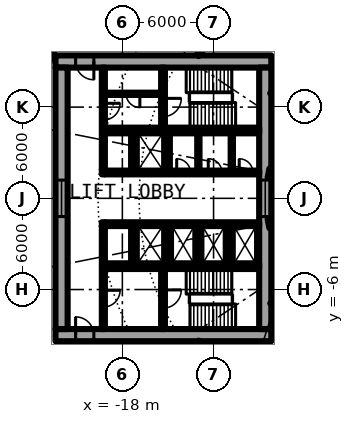
"""IFC4 building model, lengths in metres.
Left out: names, types, materials, properties, quantities, classifications, styles, units other than length and angle.
Written with IfcOpenShell. Run it as: python <this file> out.ifc"""

import sys

from ifc_helpers import new_model, si_unit, direction, frame, frame_2d, origin, origin_2d, place, context, subcontext, project, spatial, rectangle, i_section, extrude, element, fill, save


model = new_model("IFC4")
c1 = context("Model", 3, precision=1e-05, world=origin(), true_north=direction((0.0, 1.0)))
c2 = subcontext(c1, "Body", "Model", "MODEL_VIEW")
j1 = project(units=[si_unit("LENGTHUNIT", "METRE"), si_unit("PLANEANGLEUNIT", "RADIAN")], contexts=[c1])
p1 = place(None, origin())
s1 = spatial("IfcSite", under=j1, at=p1, CompositionType="ELEMENT")
p2 = place(p1, origin())
s2 = spatial("IfcBuilding", under=s1, at=p2, CompositionType="ELEMENT")
p3 = place(p2, frame((0.0, 0.0, 5.4)))
s3 = spatial("IfcBuildingStorey", under=s2, at=p3, CompositionType="ELEMENT", Elevation=5.4)
for number, where, z_axis, x_axis in (
    (1, (-8.239, 1.639, 0.0), (0.0, 0.0, 1.0), (-0.981, 0.195, 0.0)),
    (2, (-8.239, -1.639, 0.0), (0.0, 0.0, 1.0), (-0.981, -0.195, 0.0)),
):
    element("IfcColumn", number, at=place(p3, frame(where, z_axis=z_axis, x_axis=x_axis)), inside=s3, PredefinedType="COLUMN", context=c2, shape_type="SweptSolid", body=[
        extrude(i_section(OverallWidth=0.3, OverallDepth=0.6, WebThickness=0.015, FlangeThickness=0.03, FilletRadius=0.027, at=origin_2d()), origin(), (0.0, 0.0, 1.0), 4.2),
    ])
p4 = place(p3, frame((-22.4, -9.0, 0.0), z_axis=(0.0, 0.0, 1.0), x_axis=(1.0, 0.0, 0.0)))
e3 = element("IfcWall", 3, at=p4, inside=s3, PredefinedType="SHEAR", context=c2, shape_type="SweptSolid", body=[
    extrude(rectangle(XDim=14.2, YDim=0.8, at=frame_2d((7.1, 0.0))), origin(), (0.0, 0.0, 1.0), 4.2),
])
p5 = place(p4, frame((1.325, 0.0, 0.0)))
e4 = element("IfcOpeningElement", 4, at=p5, cuts=e3, PredefinedType="OPENING", context=c2, shape_type="SweptSolid", body=[
    extrude(rectangle(XDim=1.2, YDim=2.3, at=frame_2d((0.6, 1.15))), frame((0.0, 0.41, 0.0), z_axis=(0.0, -1.0, 0.0), x_axis=(1.0, 0.0, 0.0)), (0.0, 0.0, 1.0), 0.82),
])
p6 = place(p3, frame((-8.2, 9.0, 0.0), z_axis=(0.0, 0.0, 1.0), x_axis=(-1.0, 0.0, 0.0)))
e5 = element("IfcWall", 5, at=p6, inside=s3, PredefinedType="SHEAR", context=c2, shape_type="SweptSolid", body=[
    extrude(rectangle(XDim=14.2, YDim=0.8, at=frame_2d((7.1, 0.0))), origin(), (0.0, 0.0, 1.0), 4.2),
])
p7 = place(p6, frame((11.675, 0.0, 0.0)))
e6 = element("IfcOpeningElement", 6, at=p7, cuts=e5, PredefinedType="OPENING", context=c2, shape_type="SweptSolid", body=[
    extrude(rectangle(XDim=1.2, YDim=2.3, at=frame_2d((0.6, 1.15))), frame((0.0, 0.41, 0.0), z_axis=(0.0, -1.0, 0.0), x_axis=(1.0, 0.0, 0.0)), (0.0, 0.0, 1.0), 0.82),
])
p8 = place(p3, frame((-22.0, 8.6, 0.0), z_axis=(0.0, 0.0, 1.0), x_axis=(0.0, -1.0, 0.0)))
e7 = element("IfcWall", 7, at=p8, inside=s3, PredefinedType="SHEAR", context=c2, shape_type="SweptSolid", body=[
    extrude(rectangle(XDim=17.2, YDim=0.8, at=frame_2d((8.6, 0.0))), origin(), (0.0, 0.0, 1.0), 4.2),
])
p9 = place(p8, frame((7.4, 0.0, 0.1)))
e8 = element("IfcOpeningElement", 8, at=p9, cuts=e7, PredefinedType="OPENING", context=c2, shape_type="SweptSolid", body=[
    extrude(rectangle(XDim=2.4, YDim=2.2, at=frame_2d((1.2, 1.1))), frame((0.0, 0.41, 0.0), z_axis=(0.0, -1.0, 0.0), x_axis=(1.0, 0.0, 0.0)), (0.0, 0.0, 1.0), 0.82),
])
p10 = place(p3, frame((-8.6, 8.6, 0.0), z_axis=(0.0, 0.0, 1.0), x_axis=(0.0, -1.0, 0.0)))
e9 = element("IfcWall", 9, at=p10, inside=s3, PredefinedType="SHEAR", context=c2, shape_type="SweptSolid", body=[
    extrude(rectangle(XDim=17.2, YDim=0.8, at=frame_2d((8.6, 0.0))), origin(), (0.0, 0.0, 1.0), 4.2),
])
p11 = place(p10, frame((7.4, 0.0, 0.1)))
e10 = element("IfcOpeningElement", 10, at=p11, cuts=e9, PredefinedType="OPENING", context=c2, shape_type="SweptSolid", body=[
    extrude(rectangle(XDim=2.4, YDim=2.2, at=frame_2d((1.2, 1.1))), frame((0.0, 0.41, 0.0), z_axis=(0.0, -1.0, 0.0), x_axis=(1.0, 0.0, 0.0)), (0.0, 0.0, 1.0), 0.82),
])
p12 = place(p3, frame((-9.0, -1.7, 0.0), z_axis=(0.0, 0.0, 1.0), x_axis=(-1.0, 0.0, 0.0)))
e11 = element("IfcWall", 11, at=p12, inside=s3, PredefinedType="SHEAR", context=c2, shape_type="SweptSolid", body=[
    extrude(rectangle(XDim=10.15, YDim=0.25, at=frame_2d((5.075, 0.0))), origin(), (0.0, 0.0, 1.0), 4.2),
])
p13 = place(p12, frame((0.387, 0.0, 0.0)))
e12 = element("IfcOpeningElement", 12, at=p13, cuts=e11, PredefinedType="OPENING", context=c2, shape_type="SweptSolid", body=[
    extrude(rectangle(XDim=1.1, YDim=2.3, at=frame_2d((0.55, 1.15))), frame((0.0, 0.135, 0.0), z_axis=(0.0, -1.0, 0.0), x_axis=(1.0, 0.0, 0.0)), (0.0, 0.0, 1.0), 0.27),
])
p14 = place(p12, frame((2.45, 0.0, 0.0)))
e13 = element("IfcOpeningElement", 13, at=p14, cuts=e11, PredefinedType="OPENING", context=c2, shape_type="SweptSolid", body=[
    extrude(rectangle(XDim=1.1, YDim=2.3, at=frame_2d((0.55, 1.15))), frame((0.0, 0.135, 0.0), z_axis=(0.0, -1.0, 0.0), x_axis=(1.0, 0.0, 0.0)), (0.0, 0.0, 1.0), 0.27),
])
p15 = place(p12, frame((4.45, 0.0, 0.0)))
e14 = element("IfcOpeningElement", 14, at=p15, cuts=e11, PredefinedType="OPENING", context=c2, shape_type="SweptSolid", body=[
    extrude(rectangle(XDim=1.1, YDim=2.3, at=frame_2d((0.55, 1.15))), frame((0.0, 0.135, 0.0), z_axis=(0.0, -1.0, 0.0), x_axis=(1.0, 0.0, 0.0)), (0.0, 0.0, 1.0), 0.27),
])
p16 = place(p3, frame((-9.0, -4.462, 0.0), z_axis=(0.0, 0.0, 1.0), x_axis=(-1.0, 0.0, 0.0)))
e15 = element("IfcWall", 15, at=p16, inside=s3, PredefinedType="SHEAR", context=c2, shape_type="SweptSolid", body=[
    extrude(rectangle(XDim=10.15, YDim=0.375, at=frame_2d((5.075, 0.0))), origin(), (0.0, 0.0, 1.0), 4.2),
])
p17 = place(p16, frame((6.6, 0.0, 0.0)))
e16 = element("IfcOpeningElement", 16, at=p17, cuts=e15, PredefinedType="OPENING", context=c2, shape_type="SweptSolid", body=[
    extrude(rectangle(XDim=1.1, YDim=2.3, at=frame_2d((0.55, 1.15))), frame((0.0, 0.198, 0.0), z_axis=(0.0, -1.0, 0.0), x_axis=(1.0, 0.0, 0.0)), (0.0, 0.0, 1.0), 0.395),
])
p18 = place(p3, frame((-15.325, -4.65, 0.0), z_axis=(0.0, 0.0, 1.0), x_axis=(0.0, -1.0, 0.0)))
e17 = element("IfcWall", 17, at=p18, inside=s3, PredefinedType="SHEAR", context=c2, shape_type="SweptSolid", body=[
    extrude(rectangle(XDim=3.95, YDim=0.25, at=frame_2d((1.975, 0.0))), origin(), (0.0, 0.0, 1.0), 4.2),
])
p19 = place(p18, frame((1.375, 0.0, 0.0)))
e18 = element("IfcOpeningElement", 18, at=p19, cuts=e17, PredefinedType="OPENING", context=c2, shape_type="SweptSolid", body=[
    extrude(rectangle(XDim=1.2, YDim=2.3, at=frame_2d((0.6, 1.15))), frame((0.0, 0.135, 0.0), z_axis=(0.0, -1.0, 0.0), x_axis=(1.0, 0.0, 0.0)), (0.0, 0.0, 1.0), 0.27),
])
for number, where, z_axis, x_axis in (
    (19, (-15.0, -1.825, 0.0), (0.0, 0.0, 1.0), (0.0, -1.0, 0.0)),
    (20, (-17.3, -1.825, 0.0), (0.0, 0.0, 1.0), (0.0, -1.0, 0.0)),
):
    element("IfcWall", number, at=place(p3, frame(where, z_axis=z_axis, x_axis=x_axis)), inside=s3, PredefinedType="SOLIDWALL", context=c2, shape_type="SweptSolid", body=[
        extrude(rectangle(XDim=2.45, YDim=0.25, at=frame_2d((1.225, 0.0))), origin(), (0.0, 0.0, 1.0), 3.7),
    ])
p20 = place(p3, frame((-19.25, -1.575, 0.0), z_axis=(0.0, 0.0, 1.0), x_axis=(0.0, -1.0, 0.0)))
e21 = element("IfcWall", 21, at=p20, inside=s3, PredefinedType="SOLIDWALL", context=c2, shape_type="SweptSolid", body=[
    extrude(rectangle(XDim=7.025, YDim=0.2, at=frame_2d((3.513, 0.0))), origin(), (0.0, 0.0, 1.0), 3.7),
])
p21 = place(p20, frame((4.475, 0.0, 0.0)))
e22 = element("IfcOpeningElement", 22, at=p21, cuts=e21, PredefinedType="OPENING", context=c2, shape_type="SweptSolid", body=[
    extrude(rectangle(XDim=1.1, YDim=2.3, at=frame_2d((0.55, 1.15))), frame((0.0, 0.11, 0.0), z_axis=(0.0, -1.0, 0.0), x_axis=(1.0, 0.0, 0.0)), (0.0, 0.0, 1.0), 0.22),
])
p22 = place(p3, frame((-19.15, 1.7, 0.0), z_axis=(0.0, 0.0, 1.0), x_axis=(1.0, 0.0, 0.0)))
e23 = element("IfcWall", 23, at=p22, inside=s3, PredefinedType="SHEAR", context=c2, shape_type="SweptSolid", body=[
    extrude(rectangle(XDim=10.15, YDim=0.25, at=frame_2d((5.075, 0.0))), origin(), (0.0, 0.0, 1.0), 4.2),
])
p23 = place(p22, frame((2.45, 0.0, 0.0)))
e24 = element("IfcOpeningElement", 24, at=p23, cuts=e23, PredefinedType="OPENING", context=c2, shape_type="SweptSolid", body=[
    extrude(rectangle(XDim=1.1, YDim=2.3, at=frame_2d((0.55, 1.15))), frame((0.0, 0.135, 0.0), z_axis=(0.0, -1.0, 0.0), x_axis=(1.0, 0.0, 0.0)), (0.0, 0.0, 1.0), 0.27),
])
p24 = place(p22, frame((8.837, 0.0, 0.0)))
e25 = element("IfcOpeningElement", 25, at=p24, cuts=e23, PredefinedType="OPENING", context=c2, shape_type="SweptSolid", body=[
    extrude(rectangle(XDim=0.9, YDim=2.3, at=frame_2d((0.45, 1.15))), frame((0.0, 0.135, 0.0), z_axis=(0.0, -1.0, 0.0), x_axis=(1.0, 0.0, 0.0)), (0.0, 0.0, 1.0), 0.27),
])
p25 = place(p22, frame((6.8, 0.0, 0.0)))
e26 = element("IfcOpeningElement", 26, at=p25, cuts=e23, PredefinedType="OPENING", context=c2, shape_type="SweptSolid", body=[
    extrude(rectangle(XDim=0.9, YDim=2.3, at=frame_2d((0.45, 1.15))), frame((0.0, 0.135, 0.0), z_axis=(0.0, -1.0, 0.0), x_axis=(1.0, 0.0, 0.0)), (0.0, 0.0, 1.0), 0.27),
])
p26 = place(p22, frame((4.725, 0.0, 0.0)))
e27 = element("IfcOpeningElement", 27, at=p26, cuts=e23, PredefinedType="OPENING", context=c2, shape_type="SweptSolid", body=[
    extrude(rectangle(XDim=0.9, YDim=2.3, at=frame_2d((0.45, 1.15))), frame((0.0, 0.135, 0.0), z_axis=(0.0, -1.0, 0.0), x_axis=(1.0, 0.0, 0.0)), (0.0, 0.0, 1.0), 0.27),
])
p27 = place(p3, frame((-9.0, 4.462, 0.0), z_axis=(0.0, 0.0, 1.0), x_axis=(-1.0, 0.0, 0.0)))
e28 = element("IfcWall", 28, at=p27, inside=s3, PredefinedType="SHEAR", context=c2, shape_type="SweptSolid", body=[
    extrude(rectangle(XDim=10.15, YDim=0.375, at=frame_2d((5.075, 0.0))), origin(), (0.0, 0.0, 1.0), 4.2),
])
p28 = place(p3, frame((-15.325, 8.6, 0.0), z_axis=(0.0, 0.0, 1.0), x_axis=(0.0, -1.0, 0.0)))
e29 = element("IfcWall", 29, at=p28, inside=s3, PredefinedType="SHEAR", context=c2, shape_type="SweptSolid", body=[
    extrude(rectangle(XDim=3.95, YDim=0.25, at=frame_2d((1.975, 0.0))), origin(), (0.0, 0.0, 1.0), 4.2),
])
p29 = place(p28, frame((2.025, 0.0, 0.0)))
e30 = element("IfcOpeningElement", 30, at=p29, cuts=e29, PredefinedType="OPENING", context=c2, shape_type="SweptSolid", body=[
    extrude(rectangle(XDim=1.2, YDim=2.3, at=frame_2d((0.6, 1.15))), frame((0.0, 0.135, 0.0), z_axis=(0.0, -1.0, 0.0), x_axis=(1.0, 0.0, 0.0)), (0.0, 0.0, 1.0), 0.27),
])
for number, where, z_axis, x_axis in (
    (31, (-15.0, 1.825, 0.0), (0.0, 0.0, 1.0), (0.0, 1.0, 0.0)),
    (32, (-17.3, 1.825, 0.0), (0.0, 0.0, 1.0), (0.0, 1.0, 0.0)),
):
    element("IfcWall", number, at=place(p3, frame(where, z_axis=z_axis, x_axis=x_axis)), inside=s3, PredefinedType="SOLIDWALL", context=c2, shape_type="SweptSolid", body=[
        extrude(rectangle(XDim=2.45, YDim=0.25, at=frame_2d((1.225, 0.0))), origin(), (0.0, 0.0, 1.0), 3.7),
    ])
p30 = place(p3, frame((-19.25, 8.6, 0.0), z_axis=(0.0, 0.0, 1.0), x_axis=(0.0, -1.0, 0.0)))
e33 = element("IfcWall", 33, at=p30, inside=s3, PredefinedType="SOLIDWALL", context=c2, shape_type="SweptSolid", body=[
    extrude(rectangle(XDim=7.025, YDim=0.2, at=frame_2d((3.513, 0.0))), origin(), (0.0, 0.0, 1.0), 3.7),
])
p31 = place(p30, frame((2.35, 0.0, 0.0)))
e34 = element("IfcOpeningElement", 34, at=p31, cuts=e33, PredefinedType="OPENING", context=c2, shape_type="SweptSolid", body=[
    extrude(rectangle(XDim=1.1, YDim=2.3, at=frame_2d((0.55, 1.15))), frame((0.0, 0.11, 0.0), z_axis=(0.0, -1.0, 0.0), x_axis=(1.0, 0.0, 0.0)), (0.0, 0.0, 1.0), 0.22),
])
for number, where, z_axis, x_axis in (
    (35, (-11.0, -1.825, 0.0), (0.0, 0.0, 1.0), (0.0, -1.0, 0.0)),
    (36, (-13.0, -1.825, 0.0), (0.0, 0.0, 1.0), (0.0, -1.0, 0.0)),
):
    element("IfcWall", number, at=place(p3, frame(where, z_axis=z_axis, x_axis=x_axis)), inside=s3, PredefinedType="SOLIDWALL", context=c2, shape_type="SweptSolid", body=[
        extrude(rectangle(XDim=2.45, YDim=0.25, at=frame_2d((1.225, 0.0))), origin(), (0.0, 0.0, 1.0), 3.7),
    ])
for number, where, z_axis, x_axis in (
    (37, (-10.8, 1.825, 0.0), (0.0, 0.0, 1.0), (0.0, 1.0, 0.0)),
    (38, (-13.0, 1.825, 0.0), (0.0, 0.0, 1.0), (0.0, 1.0, 0.0)),
):
    element("IfcWall", number, at=place(p3, frame(where, z_axis=z_axis, x_axis=x_axis)), inside=s3, PredefinedType="PARTITIONING", context=c2, shape_type="SweptSolid", body=[
        extrude(rectangle(XDim=2.45, YDim=0.15, at=frame_2d((1.225, 0.0))), origin(), (0.0, 0.0, 1.0), 3.7),
    ])
p32 = place(p3, frame((-15.45, 6.875, 0.0), z_axis=(0.0, 0.0, 1.0), x_axis=(-1.0, 0.0, 0.0)))
e39 = element("IfcWall", 39, at=p32, inside=s3, PredefinedType="PARTITIONING", context=c2, shape_type="SweptSolid", body=[
    extrude(rectangle(XDim=3.7, YDim=0.15, at=frame_2d((1.85, 0.0))), origin(), (0.0, 0.0, 1.0), 3.7),
])
p33 = place(p32, frame((1.4, 0.0, 0.0)))
e40 = element("IfcOpeningElement", 40, at=p33, cuts=e39, PredefinedType="OPENING", context=c2, shape_type="SweptSolid", body=[
    extrude(rectangle(XDim=0.9, YDim=2.3, at=frame_2d((0.45, 1.15))), frame((0.0, 0.085, 0.0), z_axis=(0.0, -1.0, 0.0), x_axis=(1.0, 0.0, 0.0)), (0.0, 0.0, 1.0), 0.17),
])
p34 = place(p3, frame((-13.041, -9.4, 0.0), z_axis=(0.0, 0.0, 1.0), x_axis=(0.555634077892, -0.831426948977, 0.0)))
e41 = element("IfcWall", 41, at=p34, inside=s3, PredefinedType="PARTITIONING", context=c2, shape_type="SweptSolid", body=[
    extrude(rectangle(XDim=0.482, YDim=0.15, at=frame_2d((0.241, 0.0))), origin(), (0.0, 0.0, 1.0), 3.7),
])
p35 = place(p3, frame((-8.2, -6.843, 0.0), z_axis=(0.0, 0.0, 1.0), x_axis=(0.659384951594, -0.751805483893, 0.0)))
e42 = element("IfcWall", 42, at=p35, inside=s3, PredefinedType="PARTITIONING", context=c2, shape_type="SweptSolid", body=[
    extrude(rectangle(XDim=0.962, YDim=0.2, at=frame_2d((0.481, 0.0))), origin(), (0.0, 0.0, 1.0), 3.7),
])
p36 = place(p3, frame((-10.799, -18.706, 0.0), z_axis=(0.0, 0.0, 1.0), x_axis=(0.500024928676, 0.866011010728, 0.0)))
e43 = element("IfcWall", 43, at=p36, inside=s3, PredefinedType="PARTITIONING", context=c2, shape_type="SweptSolid", body=[
    extrude(rectangle(XDim=10.899, YDim=0.15, at=frame_2d((5.45, 0.0))), origin(), (0.0, 0.0, 1.0), 3.7),
])
p37 = place(p3, frame((-9.801, 12.773, 0.0), z_axis=(0.0, 0.0, 1.0), x_axis=(0.608753271334, -0.793359599829, 0.0)))
e44 = element("IfcWall", 44, at=p37, inside=s3, PredefinedType="PARTITIONING", context=c2, shape_type="SweptSolid", body=[
    extrude(rectangle(XDim=5.4, YDim=0.15, at=frame_2d((2.7, 0.0))), origin(), (0.0, 0.0, 1.0), 3.7),
])
p38 = place(p3, frame((-8.2, 6.843, 0.0), z_axis=(0.0, 0.0, 1.0), x_axis=(0.659384951594, 0.751805483893, 0.0)))
e45 = element("IfcWall", 45, at=p38, inside=s3, PredefinedType="PARTITIONING", context=c2, shape_type="SweptSolid", body=[
    extrude(rectangle(XDim=0.962, YDim=0.2, at=frame_2d((0.481, 0.0))), origin(), (0.0, 0.0, 1.0), 3.7),
])
p39 = place(p3, frame((-13.041, 9.4, 0.0), z_axis=(0.0, 0.0, 1.0), x_axis=(0.555634077892, 0.831426948977, 0.0)))
e46 = element("IfcWall", 46, at=p39, inside=s3, PredefinedType="PARTITIONING", context=c2, shape_type="SweptSolid", body=[
    extrude(rectangle(XDim=0.482, YDim=0.15, at=frame_2d((0.241, 0.0))), origin(), (0.0, 0.0, 1.0), 3.7),
])
p40 = place(p3, frame((-22.727, 9.414, 0.0), z_axis=(0.0, 0.0, 1.0), x_axis=(0.442259878763, 0.896886949195, 0.0)))
e47 = element("IfcWall", 47, at=p40, inside=s3, PredefinedType="PARTITIONING", context=c2, shape_type="SweptSolid", body=[
    extrude(rectangle(XDim=3.218, YDim=0.2, at=frame_2d((1.609, 0.0))), origin(), (0.0, 0.0, 1.0), 3.7),
])
p41 = place(p13, origin())
e48 = element("IfcDoor", 48, at=p41, inside=s3, OperationType="DOUBLE_DOOR_SLIDING", PredefinedType="DOOR", context=c2, shape_type="SweptSolid", body=[
    extrude(rectangle(XDim=1.1, YDim=2.3, at=frame_2d((0.55, 1.15))), frame((0.0, 0.025, 0.0), z_axis=(0.0, -1.0, 0.0), x_axis=(1.0, 0.0, 0.0)), (0.0, 0.0, 1.0), 0.05),
])
fill(e12, e48)
p42 = place(p14, origin())
e49 = element("IfcDoor", 49, at=p42, inside=s3, OperationType="DOUBLE_DOOR_SLIDING", PredefinedType="DOOR", context=c2, shape_type="SweptSolid", body=[
    extrude(rectangle(XDim=1.1, YDim=2.3, at=frame_2d((0.55, 1.15))), frame((0.0, 0.025, 0.0), z_axis=(0.0, -1.0, 0.0), x_axis=(1.0, 0.0, 0.0)), (0.0, 0.0, 1.0), 0.05),
])
fill(e13, e49)
p43 = place(p15, origin())
e50 = element("IfcDoor", 50, at=p43, inside=s3, OperationType="DOUBLE_DOOR_SLIDING", PredefinedType="DOOR", context=c2, shape_type="SweptSolid", body=[
    extrude(rectangle(XDim=1.1, YDim=2.3, at=frame_2d((0.55, 1.15))), frame((0.0, 0.025, 0.0), z_axis=(0.0, -1.0, 0.0), x_axis=(1.0, 0.0, 0.0)), (0.0, 0.0, 1.0), 0.05),
])
fill(e14, e50)
p44 = place(p17, origin())
e51 = element("IfcDoor", 51, at=p44, inside=s3, OperationType="DOUBLE_DOOR_SLIDING", PredefinedType="DOOR", context=c2, shape_type="SweptSolid", body=[
    extrude(rectangle(XDim=1.1, YDim=2.3, at=frame_2d((0.55, 1.15))), frame((0.0, 0.025, 0.0), z_axis=(0.0, -1.0, 0.0), x_axis=(1.0, 0.0, 0.0)), (0.0, 0.0, 1.0), 0.05),
])
fill(e16, e51)
p45 = place(p23, origin())
e52 = element("IfcDoor", 52, at=p45, inside=s3, OperationType="DOUBLE_DOOR_SLIDING", PredefinedType="DOOR", context=c2, shape_type="SweptSolid", body=[
    extrude(rectangle(XDim=1.1, YDim=2.3, at=frame_2d((0.55, 1.15))), frame((0.0, 0.025, 0.0), z_axis=(0.0, -1.0, 0.0), x_axis=(1.0, 0.0, 0.0)), (0.0, 0.0, 1.0), 0.05),
])
fill(e24, e52)
p46 = place(p24, origin())
e53 = element("IfcDoor", 53, at=p46, inside=s3, OperationType="SINGLE_SWING_LEFT", PredefinedType="DOOR", context=c2, shape_type="SweptSolid", body=[
    extrude(rectangle(XDim=0.9, YDim=2.3, at=frame_2d((0.45, 1.15))), frame((0.0, 0.025, 0.0), z_axis=(0.0, -1.0, 0.0), x_axis=(1.0, 0.0, 0.0)), (0.0, 0.0, 1.0), 0.05),
])
fill(e25, e53)
p47 = place(p25, origin())
e54 = element("IfcDoor", 54, at=p47, inside=s3, OperationType="SINGLE_SWING_LEFT", PredefinedType="DOOR", context=c2, shape_type="SweptSolid", body=[
    extrude(rectangle(XDim=0.9, YDim=2.3, at=frame_2d((0.45, 1.15))), frame((0.0, 0.025, 0.0), z_axis=(0.0, -1.0, 0.0), x_axis=(1.0, 0.0, 0.0)), (0.0, 0.0, 1.0), 0.05),
])
fill(e26, e54)
p48 = place(p26, origin())
e55 = element("IfcDoor", 55, at=p48, inside=s3, OperationType="SINGLE_SWING_LEFT", PredefinedType="DOOR", context=c2, shape_type="SweptSolid", body=[
    extrude(rectangle(XDim=0.9, YDim=2.3, at=frame_2d((0.45, 1.15))), frame((0.0, 0.025, 0.0), z_axis=(0.0, -1.0, 0.0), x_axis=(1.0, 0.0, 0.0)), (0.0, 0.0, 1.0), 0.05),
])
fill(e27, e55)
p49 = place(p33, origin())
e56 = element("IfcDoor", 56, at=p49, inside=s3, OperationType="SINGLE_SWING_LEFT", PredefinedType="DOOR", context=c2, shape_type="SweptSolid", body=[
    extrude(rectangle(XDim=0.9, YDim=2.3, at=frame_2d((0.45, 1.15))), frame((0.0, 0.025, 0.0), z_axis=(0.0, -1.0, 0.0), x_axis=(1.0, 0.0, 0.0)), (0.0, 0.0, 1.0), 0.05),
])
fill(e40, e56)
p50 = place(p19, origin())
e57 = element("IfcDoor", 57, at=p50, inside=s3, OperationType="SINGLE_SWING_LEFT", PredefinedType="DOOR", context=c2, shape_type="SweptSolid", body=[
    extrude(rectangle(XDim=1.2, YDim=2.3, at=frame_2d((0.6, 1.15))), frame((0.0, 0.025, 0.0), z_axis=(0.0, -1.0, 0.0), x_axis=(1.0, 0.0, 0.0)), (0.0, 0.0, 1.0), 0.05),
])
fill(e18, e57)
p51 = place(p29, origin())
e58 = element("IfcDoor", 58, at=p51, inside=s3, OperationType="SINGLE_SWING_LEFT", PredefinedType="DOOR", context=c2, shape_type="SweptSolid", body=[
    extrude(rectangle(XDim=1.2, YDim=2.3, at=frame_2d((0.6, 1.15))), frame((0.0, 0.025, 0.0), z_axis=(0.0, -1.0, 0.0), x_axis=(1.0, 0.0, 0.0)), (0.0, 0.0, 1.0), 0.05),
])
fill(e30, e58)
p52 = place(p21, origin())
e59 = element("IfcDoor", 59, at=p52, inside=s3, OperationType="SINGLE_SWING_LEFT", PredefinedType="DOOR", context=c2, shape_type="SweptSolid", body=[
    extrude(rectangle(XDim=1.1, YDim=2.3, at=frame_2d((0.55, 1.15))), frame((0.0, 0.025, 0.0), z_axis=(0.0, -1.0, 0.0), x_axis=(1.0, 0.0, 0.0)), (0.0, 0.0, 1.0), 0.05),
])
fill(e22, e59)
p53 = place(p31, origin())
e60 = element("IfcDoor", 60, at=p53, inside=s3, OperationType="SINGLE_SWING_RIGHT", PredefinedType="DOOR", context=c2, shape_type="SweptSolid", body=[
    extrude(rectangle(XDim=1.1, YDim=2.3, at=frame_2d((0.55, 1.15))), frame((0.0, 0.025, 0.0), z_axis=(0.0, -1.0, 0.0), x_axis=(1.0, 0.0, 0.0)), (0.0, 0.0, 1.0), 0.05),
])
fill(e34, e60)
p54 = place(p5, origin())
e61 = element("IfcDoor", 61, at=p54, inside=s3, OperationType="SINGLE_SWING_RIGHT", PredefinedType="DOOR", context=c2, shape_type="SweptSolid", body=[
    extrude(rectangle(XDim=1.2, YDim=2.3, at=frame_2d((0.6, 1.15))), frame((0.0, 0.025, 0.0), z_axis=(0.0, -1.0, 0.0), x_axis=(1.0, 0.0, 0.0)), (0.0, 0.0, 1.0), 0.05),
])
fill(e4, e61)
p55 = place(p7, origin())
e62 = element("IfcDoor", 62, at=p55, inside=s3, OperationType="SINGLE_SWING_LEFT", PredefinedType="DOOR", context=c2, shape_type="SweptSolid", body=[
    extrude(rectangle(XDim=1.2, YDim=2.3, at=frame_2d((0.6, 1.15))), frame((0.0, 0.025, 0.0), z_axis=(0.0, -1.0, 0.0), x_axis=(1.0, 0.0, 0.0)), (0.0, 0.0, 1.0), 0.05),
])
fill(e6, e62)
p56 = place(p11, origin())
e63 = element("IfcWindow", 63, at=p56, inside=s3, PartitioningType="SINGLE_PANEL", PredefinedType="WINDOW", context=c2, shape_type="SweptSolid", body=[
    extrude(rectangle(XDim=2.4, YDim=2.2, at=frame_2d((1.2, 1.1))), frame((0.0, 0.03, 0.0), z_axis=(0.0, -1.0, 0.0), x_axis=(1.0, 0.0, 0.0)), (0.0, 0.0, 1.0), 0.06),
])
fill(e10, e63)
p57 = place(p9, origin())
e64 = element("IfcWindow", 64, at=p57, inside=s3, PartitioningType="SINGLE_PANEL", PredefinedType="WINDOW", context=c2, shape_type="SweptSolid", body=[
    extrude(rectangle(XDim=2.4, YDim=2.2, at=frame_2d((1.2, 1.1))), frame((0.0, 0.03, 0.0), z_axis=(0.0, -1.0, 0.0), x_axis=(1.0, 0.0, 0.0)), (0.0, 0.0, 1.0), 0.06),
])
fill(e8, e64)
save(model, sys.argv[1])
